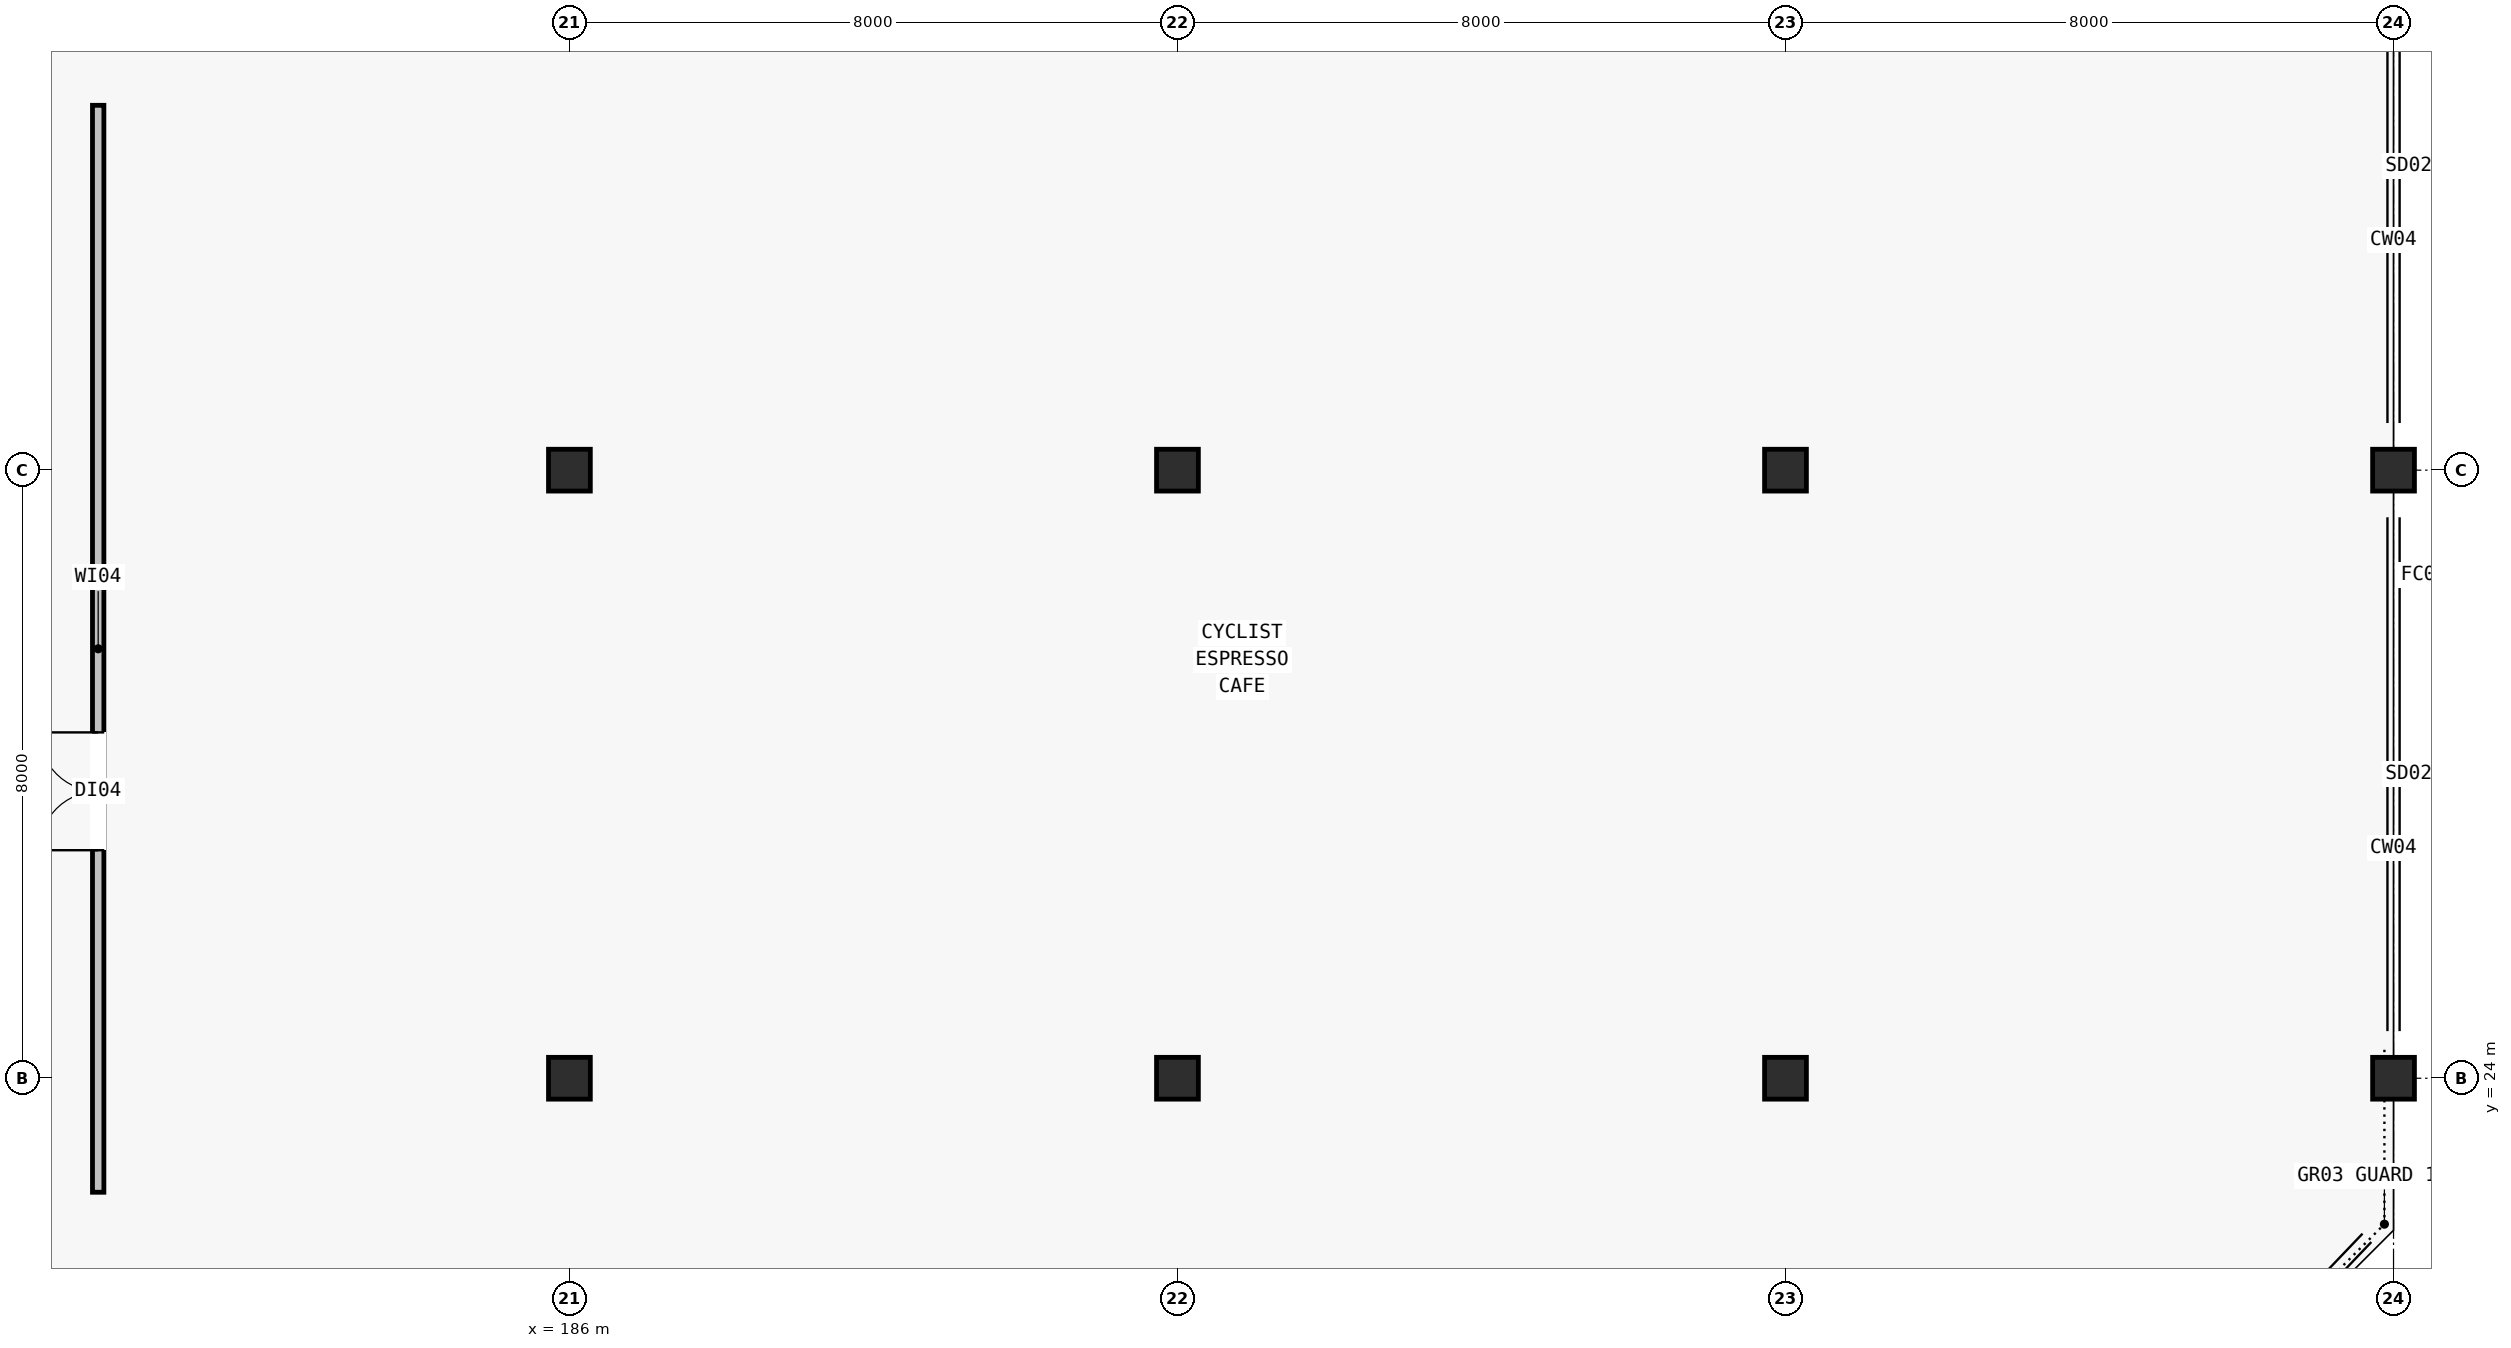
"""IFC4 building model, lengths in metres.
Left out: names, types, materials, properties, quantities, classifications, styles, units other than length and angle.
Written with IfcOpenShell. Run it as: python <this file> out.ifc"""

import sys

from ifc_helpers import new_model, si_unit, direction, frame, frame_2d, origin, origin_2d, place, context, subcontext, project, spatial, rectangle, extrude, element, fill, save


model = new_model("IFC4")
c1 = context("Model", 3, precision=1e-05, world=origin(), true_north=direction((0.0, 1.0)))
c2 = subcontext(c1, "Body", "Model", "MODEL_VIEW")
j1 = project(units=[si_unit("LENGTHUNIT", "METRE"), si_unit("PLANEANGLEUNIT", "RADIAN")], contexts=[c1])
p1 = place(None, origin())
s1 = spatial("IfcSite", under=j1, at=p1, CompositionType="ELEMENT")
p2 = place(p1, origin())
s2 = spatial("IfcBuilding", under=s1, at=p2, CompositionType="ELEMENT")
p3 = place(p2, frame((0.0, 0.0, 13.4)))
s3 = spatial("IfcBuildingStorey", under=s2, at=p3, CompositionType="ELEMENT", Elevation=13.4)
for number, where, z_axis, x_axis in (
    (1, (186.0, 24.0, 0.0), (0.0, 0.0, 1.0), (1.0, 0.0, 0.0)),
    (2, (186.0, 32.0, 0.0), (0.0, 0.0, 1.0), (1.0, 0.0, 0.0)),
    (3, (194.0, 24.0, 0.0), (0.0, 0.0, 1.0), (1.0, 0.0, 0.0)),
    (4, (194.0, 32.0, 0.0), (0.0, 0.0, 1.0), (1.0, 0.0, 0.0)),
    (5, (202.0, 24.0, 0.0), (0.0, 0.0, 1.0), (1.0, 0.0, 0.0)),
    (6, (202.0, 32.0, 0.0), (0.0, 0.0, 1.0), (1.0, 0.0, 0.0)),
    (7, (210.0, 24.0, 0.0), (0.0, 0.0, 1.0), (1.0, 0.0, 0.0)),
    (8, (210.0, 32.0, 0.0), (0.0, 0.0, 1.0), (1.0, 0.0, 0.0)),
):
    element("IfcColumn", number, at=place(p3, frame(where, z_axis=z_axis, x_axis=x_axis)), inside=s3, PredefinedType="COLUMN", context=c2, shape_type="SweptSolid", body=[
        extrude(rectangle(XDim=0.55, YDim=0.55, at=origin_2d()), origin(), (0.0, 0.0, 1.0), 3.9),
    ])
p4 = place(p3, frame((179.8, 22.5, 0.0), z_axis=(0.0, 0.0, 1.0), x_axis=(0.0, 1.0, 0.0)))
e9 = element("IfcWall", 9, at=p4, inside=s3, PredefinedType="PARTITIONING", context=c2, shape_type="SweptSolid", body=[
    extrude(rectangle(XDim=14.3, YDim=0.15, at=frame_2d((7.15, 0.0))), origin(), (0.0, 0.0, 1.0), 2.48),
])
p5 = place(p4, frame((4.5, 0.0, 0.0)))
e10 = element("IfcOpeningElement", 10, at=p5, cuts=e9, PredefinedType="OPENING", context=c2, shape_type="SweptSolid", body=[
    extrude(rectangle(XDim=1.55, YDim=2.2, at=frame_2d((0.775, 1.1))), frame((0.0, 0.085, 0.0), z_axis=(0.0, -1.0, 0.0), x_axis=(1.0, 0.0, 0.0)), (0.0, 0.0, 1.0), 0.17),
])
p6 = place(p5, origin())
e11 = element("IfcDoor", 11, at=p6, inside=s3, OperationType="DOUBLE_SWING_LEFT", PredefinedType="DOOR", context=c2, shape_type="SweptSolid", body=[
    extrude(rectangle(XDim=1.55, YDim=2.2, at=frame_2d((0.775, 1.1))), frame((0.0, 0.025, 0.0), z_axis=(0.0, -1.0, 0.0), x_axis=(1.0, 0.0, 0.0)), (0.0, 0.0, 1.0), 0.05),
])
fill(e10, e11)
save(model, sys.argv[1])
